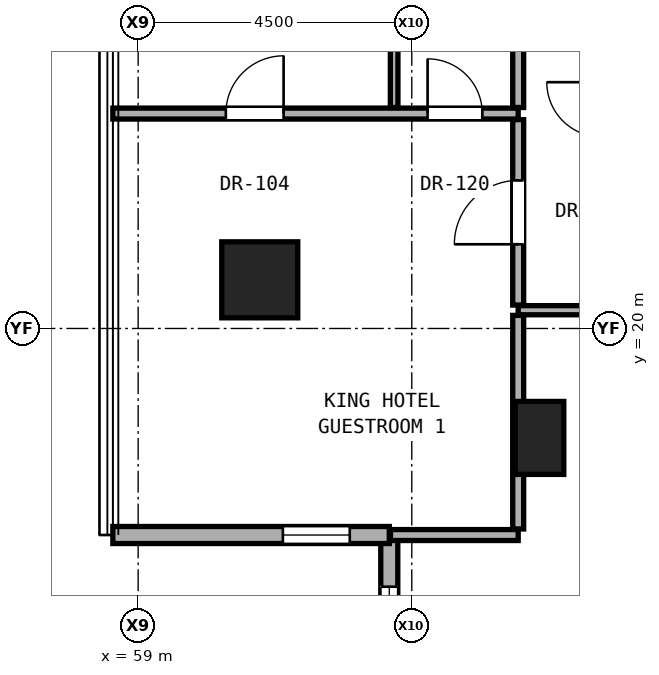
"""IFC4 building model, lengths in metres.
Left out: names, types, materials, properties, quantities, classifications, styles, units other than length and angle.
Written with IfcOpenShell. Run it as: python <this file> out.ifc"""

import sys

from ifc_helpers import new_model, si_unit, direction, frame, frame_2d, origin, origin_2d, place, context, subcontext, project, spatial, rectangle, hollow_rectangle, extrude, element, fill, save


model = new_model("IFC4")
c1 = context("Model", 3, precision=1e-05, world=origin(), true_north=direction((0.0, 1.0)))
c2 = subcontext(c1, "Body", "Model", "MODEL_VIEW")
j1 = project(units=[si_unit("LENGTHUNIT", "METRE"), si_unit("PLANEANGLEUNIT", "RADIAN")], contexts=[c1])
p1 = place(None, origin())
s1 = spatial("IfcSite", under=j1, at=p1, CompositionType="ELEMENT")
p2 = place(p1, origin())
s2 = spatial("IfcBuilding", under=s1, at=p2, CompositionType="ELEMENT")
p3 = place(p2, frame((0.0, 0.0, 58.7)))
s3 = spatial("IfcBuildingStorey", under=s2, at=p3, CompositionType="ELEMENT", Elevation=58.7)
p4 = place(p3, frame((61.0, 20.8, 0.0), z_axis=(0.0, 0.0, 1.0), x_axis=(1.0, 0.0, 0.0)))
e1 = element("IfcColumn", 1, at=p4, inside=s3, PredefinedType="COLUMN", context=c2, shape_type="SweptSolid", body=[
    extrude(hollow_rectangle(XDim=1.25, YDim=1.25, WallThickness=0.07, at=origin_2d()), origin(), (0.0, 0.0, 1.0), 3.3),
])
p5 = place(p3, frame((65.6, 18.2, 0.0), z_axis=(0.0, 0.0, 1.0), x_axis=(1.0, 0.0, 0.0)))
e2 = element("IfcColumn", 2, at=p5, inside=s3, PredefinedType="PILASTER", context=c2, shape_type="SweptSolid", body=[
    extrude(rectangle(XDim=0.8, YDim=1.2, at=origin_2d()), origin(), (0.0, 0.0, 1.0), 3.3),
])
p6 = place(p3, frame((63.13, 16.604, 0.0), z_axis=(0.0, 0.0, 1.0), x_axis=(0.0, -1.0, 0.0)))
e3 = element("IfcWall", 3, at=p6, inside=s3, PredefinedType="SOLIDWALL", context=c2, shape_type="SweptSolid", body=[
    extrude(rectangle(XDim=4.546, YDim=0.28, at=frame_2d((2.273, 0.0))), origin(), (0.0, 0.0, 1.0), 3.04),
])
p7 = place(p6, frame((0.85, 0.0, 0.79)))
e4 = element("IfcOpeningElement", 4, at=p7, cuts=e3, PredefinedType="OPENING", context=c2, shape_type="SweptSolid", body=[
    extrude(rectangle(XDim=1.5, YDim=2.1, at=frame_2d((0.75, 1.05))), frame((0.0, 0.15, 0.0), z_axis=(0.0, -1.0, 0.0), x_axis=(1.0, 0.0, 0.0)), (0.0, 0.0, 1.0), 0.3),
])
p8 = place(p3, frame((58.584, 16.604, 0.0), z_axis=(0.0, 0.0, 1.0), x_axis=(1.0, 0.0, 0.0)))
e5 = element("IfcWall", 5, at=p8, inside=s3, PredefinedType="SOLIDWALL", context=c2, shape_type="SweptSolid", body=[
    extrude(rectangle(XDim=4.546, YDim=0.28, at=frame_2d((2.273, 0.0))), origin(), (0.0, 0.0, 1.0), 3.04),
])
p9 = place(p8, frame((2.796, 0.0, 0.85)))
e6 = element("IfcOpeningElement", 6, at=p9, cuts=e5, PredefinedType="OPENING", context=c2, shape_type="SweptSolid", body=[
    extrude(rectangle(XDim=1.1, YDim=2.0, at=frame_2d((0.55, 1.0))), frame((0.0, 0.15, 0.0), z_axis=(0.0, -1.0, 0.0), x_axis=(1.0, 0.0, 0.0)), (0.0, 0.0, 1.0), 0.3),
])
p10 = place(p3, frame((63.15, 16.603, 0.0), z_axis=(0.0, 0.0, 1.0), x_axis=(1.0, 0.0, 0.0)))
e7 = element("IfcWall", 7, at=p10, inside=s3, PredefinedType="PARTITIONING", context=c2, shape_type="SweptSolid", body=[
    extrude(rectangle(XDim=2.1, YDim=0.18, at=frame_2d((1.05, 0.0))), origin(), (0.0, 0.0, 1.0), 3.06),
])
p11 = place(p3, frame((65.25, 20.3, 0.0), z_axis=(0.0, 0.0, 1.0), x_axis=(1.0, 0.0, 0.0)))
e8 = element("IfcWall", 8, at=p11, inside=s3, PredefinedType="PARTITIONING", context=c2, shape_type="SweptSolid", body=[
    extrude(rectangle(XDim=1.37, YDim=0.15, at=frame_2d((0.685, 0.0))), origin(), (0.0, 0.0, 1.0), 3.06),
])
p12 = place(p3, frame((58.584, 23.534, 0.0), z_axis=(0.0, 0.0, 1.0), x_axis=(1.0, 0.0, 0.0)))
e9 = element("IfcWall", 9, at=p12, inside=s3, PredefinedType="PARTITIONING", context=c2, shape_type="SweptSolid", body=[
    extrude(rectangle(XDim=6.666, YDim=0.18, at=frame_2d((3.333, 0.0))), origin(), (0.0, 0.0, 1.0), 2.196),
])
p13 = place(p12, frame((1.858, 0.0, 0.0)))
e10 = element("IfcOpeningElement", 10, at=p13, cuts=e9, PredefinedType="OPENING", context=c2, shape_type="SweptSolid", body=[
    extrude(rectangle(XDim=0.95, YDim=2.15, at=frame_2d((0.475, 1.075))), frame((0.0, 0.1, 0.0), z_axis=(0.0, -1.0, 0.0), x_axis=(1.0, 0.0, 0.0)), (0.0, 0.0, 1.0), 0.2),
])
p14 = place(p12, frame((5.176, 0.0, 0.0)))
e11 = element("IfcOpeningElement", 11, at=p14, cuts=e9, PredefinedType="OPENING", context=c2, shape_type="SweptSolid", body=[
    extrude(rectangle(XDim=0.9, YDim=2.1, at=frame_2d((0.45, 1.05))), frame((0.0, 0.1, 0.0), z_axis=(0.0, -1.0, 0.0), x_axis=(1.0, 0.0, 0.0)), (0.0, 0.0, 1.0), 0.2),
])
p15 = place(p3, frame((63.21, 23.634, 0.0), z_axis=(0.0, 0.0, 1.0), x_axis=(0.0, 1.0, 0.0)))
e12 = element("IfcWall", 12, at=p15, inside=s3, PredefinedType="PARTITIONING", context=c2, shape_type="SweptSolid", body=[
    extrude(rectangle(XDim=2.115, YDim=0.125, at=frame_2d((1.058, 0.0))), origin(), (0.0, 0.0, 1.0), 3.06),
])
p16 = place(p3, frame((65.25, 16.703, 0.0), z_axis=(0.0, 0.0, 1.0), x_axis=(0.0, 1.0, 0.0)))
e13 = element("IfcWall", 13, at=p16, inside=s3, PredefinedType="PARTITIONING", context=c2, shape_type="SweptSolid", body=[
    extrude(rectangle(XDim=3.512, YDim=0.18, at=frame_2d((1.756, 0.0))), origin(), (0.0, 0.0, 1.0), 2.436),
])
p17 = place(p3, frame((65.25, 20.385, 0.0), z_axis=(0.0, 0.0, 1.0), x_axis=(0.0, 1.0, 0.0)))
e14 = element("IfcWall", 14, at=p17, inside=s3, PredefinedType="PARTITIONING", context=c2, shape_type="SweptSolid", body=[
    extrude(rectangle(XDim=3.049, YDim=0.18, at=frame_2d((1.524, 0.0))), origin(), (0.0, 0.0, 1.0), 2.452),
])
p18 = place(p17, frame((1.0, 0.0, 0.0)))
e15 = element("IfcOpeningElement", 15, at=p18, cuts=e14, PredefinedType="OPENING", context=c2, shape_type="SweptSolid", body=[
    extrude(rectangle(XDim=1.05, YDim=2.2, at=frame_2d((0.525, 1.1))), frame((0.0, 0.1, 0.0), z_axis=(0.0, -1.0, 0.0), x_axis=(1.0, 0.0, 0.0)), (0.0, 0.0, 1.0), 0.2),
])
p19 = place(p3, frame((65.25, 23.634, 0.0), z_axis=(0.0, 0.0, 1.0), x_axis=(0.0, 1.0, 0.0)))
e16 = element("IfcWall", 16, at=p19, inside=s3, PredefinedType="PARTITIONING", context=c2, shape_type="SweptSolid", body=[
    extrude(rectangle(XDim=2.115, YDim=0.18, at=frame_2d((1.058, 0.0))), origin(), (0.0, 0.0, 1.0), 3.06),
])
p20 = place(p7, origin())
e17 = element("IfcWindow", 17, at=p20, inside=s3, PartitioningType="SINGLE_PANEL", PredefinedType="WINDOW", context=c2, shape_type="SweptSolid", body=[
    extrude(rectangle(XDim=1.5, YDim=2.1, at=frame_2d((0.75, 1.05))), frame((0.0, 0.03, 0.0), z_axis=(0.0, -1.0, 0.0), x_axis=(1.0, 0.0, 0.0)), (0.0, 0.0, 1.0), 0.06),
])
fill(e4, e17)
p21 = place(p9, origin())
e18 = element("IfcWindow", 18, at=p21, inside=s3, PartitioningType="SINGLE_PANEL", PredefinedType="WINDOW", context=c2, shape_type="SweptSolid", body=[
    extrude(rectangle(XDim=1.1, YDim=2.0, at=frame_2d((0.55, 1.0))), frame((0.0, 0.03, 0.0), z_axis=(0.0, -1.0, 0.0), x_axis=(1.0, 0.0, 0.0)), (0.0, 0.0, 1.0), 0.06),
])
fill(e6, e18)
p22 = place(p18, origin())
e19 = element("IfcDoor", 19, at=p22, inside=s3, OperationType="SINGLE_SWING_LEFT", PredefinedType="DOOR", context=c2, shape_type="SweptSolid", body=[
    extrude(rectangle(XDim=1.05, YDim=2.2, at=frame_2d((0.525, 1.1))), frame((0.0, 0.025, 0.0), z_axis=(0.0, -1.0, 0.0), x_axis=(1.0, 0.0, 0.0)), (0.0, 0.0, 1.0), 0.05),
])
fill(e15, e19)
p23 = place(p13, origin())
e20 = element("IfcDoor", 20, at=p23, inside=s3, OperationType="SINGLE_SWING_RIGHT", PredefinedType="DOOR", context=c2, shape_type="SweptSolid", body=[
    extrude(rectangle(XDim=0.95, YDim=2.15, at=frame_2d((0.475, 1.075))), frame((0.0, 0.025, 0.0), z_axis=(0.0, -1.0, 0.0), x_axis=(1.0, 0.0, 0.0)), (0.0, 0.0, 1.0), 0.05),
])
fill(e10, e20)
p24 = place(p14, origin())
e21 = element("IfcDoor", 21, at=p24, inside=s3, OperationType="SINGLE_SWING_LEFT", PredefinedType="DOOR", context=c2, shape_type="SweptSolid", body=[
    extrude(rectangle(XDim=0.9, YDim=2.1, at=frame_2d((0.45, 1.05))), frame((0.0, 0.025, 0.0), z_axis=(0.0, -1.0, 0.0), x_axis=(1.0, 0.0, 0.0)), (0.0, 0.0, 1.0), 0.05),
])
fill(e11, e21)
save(model, sys.argv[1])
